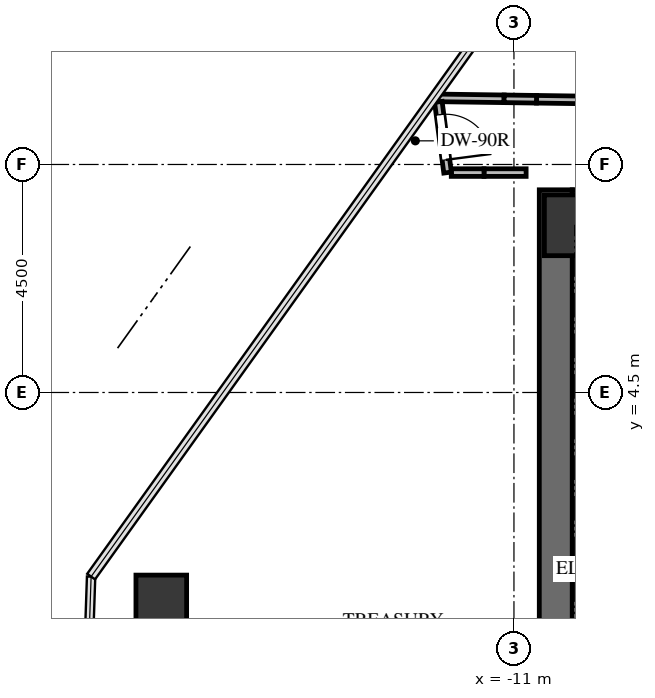
"""IFC4 building model, lengths in metres.
Left out: names, types, materials, properties, quantities, classifications, styles, units other than length and angle.
Written with IfcOpenShell. Run it as: python <this file> out.ifc"""

import sys

from ifc_helpers import new_model, si_unit, direction, frame, frame_2d, origin, origin_2d, place, context, subcontext, project, spatial, rectangle, extrude, source, transform, mapped, element, fill, save


model = new_model("IFC4")
c1 = context("Model", 3, precision=1e-05, world=origin(), true_north=direction((0.0, 1.0)))
c2 = subcontext(c1, "Body", "Model", "MODEL_VIEW")
j1 = project(units=[si_unit("LENGTHUNIT", "METRE"), si_unit("PLANEANGLEUNIT", "RADIAN")], contexts=[c1])
p1 = place(None, origin())
s1 = spatial("IfcSite", under=j1, at=p1, CompositionType="ELEMENT")
p2 = place(p1, origin())
s2 = spatial("IfcBuilding", under=s1, at=p2, CompositionType="ELEMENT")
p3 = place(p2, frame((0.0, 0.0, 200.2)))
s3 = spatial("IfcBuildingStorey", under=s2, at=p3, CompositionType="ELEMENT", Elevation=200.2)
p4 = place(p3, frame((-10.175, -8.5, 0.0), z_axis=(0.0, 0.0, 1.0), x_axis=(0.0, 1.0, 0.0)))
e1 = element("IfcWall", 1, at=p4, inside=s3, PredefinedType="SHEAR", context=c2, shape_type="SweptSolid", body=[
    extrude(rectangle(XDim=17.0, YDim=0.65, at=frame_2d((8.5, 0.0))), origin(), (0.0, 0.0, 1.0), 3.0),
])
p5 = place(p3, frame((-9.85, 8.175, 0.0), z_axis=(0.0, 0.0, 1.0), x_axis=(1.0, 0.0, 0.0)))
e2 = element("IfcWall", 2, at=p5, inside=s3, PredefinedType="SHEAR", context=c2, shape_type="SweptSolid", body=[
    extrude(rectangle(XDim=19.7, YDim=0.65, at=frame_2d((9.85, 0.0))), origin(), (0.0, 0.0, 1.0), 3.0),
])
m1 = source(origin(), c2, "Body", "SweptSolid", [
    extrude(rectangle(XDim=1.2, YDim=1.2, at=origin_2d()), origin(), (0.0, 0.0, 1.0), 3.0),
])
p6 = place(p3, frame((-9.8, 7.8, -0.24), z_axis=(0.0, 0.0, 1.0), x_axis=(1.0, 0.0, 0.0)))
e3 = element("IfcColumn", 3, at=p6, inside=s3, PredefinedType="COLUMN", context=c2, shape_type="MappedRepresentation", body=[
    mapped(m1, transform((0.0, 0.0, 0.0), x_axis=(1.0, 0.0, 0.0), y_axis=(0.0, 1.0, 0.0), z_axis=(0.0, 0.0, 1.0), scale=1.0)),
])
m2 = source(origin(), c2, "Body", "SweptSolid", [
    extrude(rectangle(XDim=1.0, YDim=1.0, at=origin_2d()), origin(), (0.0, 0.0, 1.0), 3.0),
])
p7 = place(p3, frame((-17.96, 0.396, -0.24), z_axis=(0.0, 0.0, 1.0), x_axis=(1.0, 0.0, 0.0)))
e4 = element("IfcColumn", 4, at=p7, inside=s3, PredefinedType="COLUMN", context=c2, shape_type="MappedRepresentation", body=[
    mapped(m2, transform((0.0, 0.0, 0.0), x_axis=(1.0, 0.0, 0.0), y_axis=(0.0, 1.0, 0.0), z_axis=(0.0, 0.0, 1.0), scale=1.0)),
])
p8 = place(p3, frame((-7.315, 10.241, 0.0), z_axis=(0.0, 0.0, 1.0), x_axis=(-0.99990075336, 0.014088414774, 0.0)))
e5 = element("IfcWall", 5, at=p8, inside=s3, PredefinedType="PARTITIONING", context=c2, shape_type="SweptSolid", body=[
    extrude(rectangle(XDim=3.24, YDim=0.15, at=frame_2d((1.62, 0.0))), origin(), (0.0, 0.0, 1.0), 2.745),
])
p9 = place(p3, frame((-11.194, 10.296, 0.0), z_axis=(0.0, 0.0, 1.0), x_axis=(-0.999900583231, 0.014100484163, 0.0)))
e6 = element("IfcWall", 6, at=p9, inside=s3, PredefinedType="PARTITIONING", context=c2, shape_type="SweptSolid", body=[
    extrude(rectangle(XDim=1.385, YDim=0.15, at=frame_2d((0.693, 0.0))), origin(), (0.0, 0.0, 1.0), 2.745),
])
p10 = place(p3, frame((-10.555, 10.287, 0.0), z_axis=(0.0, 0.0, 1.0), x_axis=(-0.999900221389, 0.014126119966, 0.0)))
e7 = element("IfcWall", 7, at=p10, inside=s3, PredefinedType="PARTITIONING", context=c2, shape_type="SweptSolid", body=[
    extrude(rectangle(XDim=0.639, YDim=0.15, at=frame_2d((0.32, 0.0))), origin(), (0.0, 0.0, 1.0), 2.099),
])
p11 = place(p3, frame((-11.591, 8.84, 0.0), z_axis=(0.0, 0.0, 1.0), x_axis=(1.0, 0.0, 0.0)))
e8 = element("IfcWall", 8, at=p11, inside=s3, PredefinedType="PARTITIONING", context=c2, shape_type="SweptSolid", body=[
    extrude(rectangle(XDim=0.831, YDim=0.15, at=frame_2d((0.416, 0.0))), origin(), (0.0, 0.0, 1.0), 2.745),
])
p12 = place(p3, frame((-12.237, 8.84, 0.0), z_axis=(0.0, 0.0, 1.0), x_axis=(1.0, 0.0, 0.0)))
e9 = element("IfcWall", 9, at=p12, inside=s3, PredefinedType="PARTITIONING", context=c2, shape_type="SweptSolid", body=[
    extrude(rectangle(XDim=0.646, YDim=0.15, at=frame_2d((0.323, 0.0))), origin(), (0.0, 0.0, 1.0), 2.099),
])
p13 = place(p3, frame((-12.492, 10.235, 0.0), z_axis=(0.0, 0.0, 1.0), x_axis=(0.129435611613, -0.991587828912, 0.0)))
e10 = element("IfcWall", 10, at=p13, inside=s3, PredefinedType="PARTITIONING", context=c2, shape_type="SweptSolid", body=[
    extrude(rectangle(XDim=1.407, YDim=0.15, at=frame_2d((0.704, 0.0))), origin(), (0.0, 0.0, 1.0), 2.745),
])
p14 = place(p13, frame((0.254, 0.0, 0.0)))
e11 = element("IfcOpeningElement", 11, at=p14, cuts=e10, PredefinedType="OPENING", context=c2, shape_type="SweptSolid", body=[
    extrude(rectangle(XDim=0.9, YDim=2.05, at=frame_2d((0.45, 1.025))), frame((0.0, 0.085, 0.0), z_axis=(0.0, -1.0, 0.0), x_axis=(1.0, 0.0, 0.0)), (0.0, 0.0, 1.0), 0.17),
])
m3 = source(origin(), c2, "Body", "SweptSolid", [
    extrude(rectangle(XDim=0.9, YDim=2.05, at=frame_2d((0.45, 1.025))), frame((0.0, 0.025, 0.0), z_axis=(0.0, -1.0, 0.0), x_axis=(1.0, 0.0, 0.0)), (0.0, 0.0, 1.0), 0.05),
])
p15 = place(p14, origin())
e12 = element("IfcDoor", 12, at=p15, inside=s3, OperationType="SINGLE_SWING_RIGHT", PredefinedType="DOOR", context=c2, shape_type="MappedRepresentation", body=[
    mapped(m3, transform((0.0, 0.0, 0.0), x_axis=(1.0, 0.0, 0.0), y_axis=(0.0, 1.0, 0.0), z_axis=(0.0, 0.0, 1.0), scale=1.0)),
])
fill(e11, e12)
save(model, sys.argv[1])
